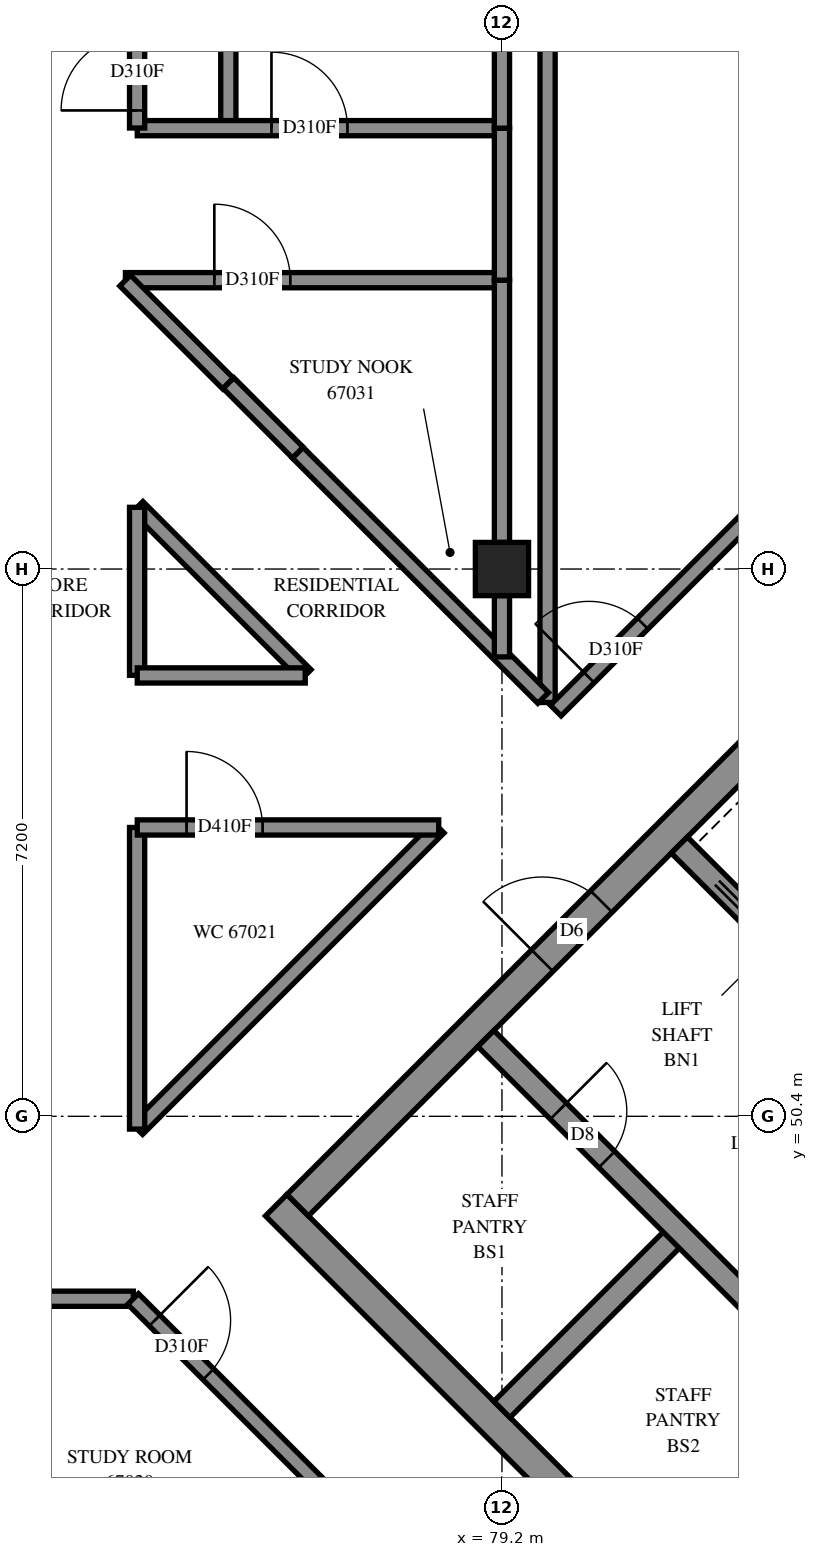
"""IFC4 building model, lengths in metres.
Left out: names, types, materials, properties, quantities, classifications, styles, units other than length and angle.
Written with IfcOpenShell. Run it as: python <this file> out.ifc"""

import sys

from ifc_helpers import new_model, si_unit, direction, frame, frame_2d, origin, origin_2d, place, context, subcontext, project, spatial, rectangle, extrude, element, fill, save


model = new_model("IFC4")
c1 = context("Model", 3, precision=1e-05, world=origin(), true_north=direction((0.0, 1.0)))
c2 = subcontext(c1, "Body", "Model", "MODEL_VIEW")
j1 = project(units=[si_unit("LENGTHUNIT", "METRE"), si_unit("PLANEANGLEUNIT", "RADIAN")], contexts=[c1])
p1 = place(None, origin())
s1 = spatial("IfcSite", under=j1, at=p1, CompositionType="ELEMENT")
p2 = place(p1, origin())
s2 = spatial("IfcBuilding", under=s1, at=p2, CompositionType="ELEMENT")
p3 = place(p2, frame((0.0, 0.0, 247.2)))
s3 = spatial("IfcBuildingStorey", under=s2, at=p3, CompositionType="ELEMENT", Elevation=247.2)
p4 = place(p3, frame((79.2, 57.6, 0.0), z_axis=(0.0, 0.0, 1.0), x_axis=(1.0, 0.0, 0.0)))
e1 = element("IfcColumn", 1, at=p4, inside=s3, PredefinedType="COLUMN", context=c2, shape_type="SweptSolid", body=[
    extrude(rectangle(XDim=0.7, YDim=0.7, at=origin_2d()), origin(), (0.0, 0.0, 1.0), 3.1),
])
p5 = place(p3, frame((76.23, 49.231, -0.3), z_axis=(0.0, 0.0, 1.0), x_axis=(0.7071034917, -0.7071100706, 0.0)))
e2 = element("IfcWall", 2, at=p5, inside=s3, PredefinedType="SHEAR", context=c2, shape_type="SweptSolid", body=[
    extrude(rectangle(XDim=15.2, YDim=0.4, at=frame_2d((7.6, 0.0))), origin(), (0.0, 0.0, 1.0), 2.7),
])
p6 = place(p3, frame((76.513, 49.231, -0.3), z_axis=(0.0, 0.0, 1.0), x_axis=(0.7071067812, 0.7071067812, 0.0)))
e3 = element("IfcWall", 3, at=p6, inside=s3, PredefinedType="SHEAR", context=c2, shape_type="SweptSolid", body=[
    extrude(rectangle(XDim=14.4, YDim=0.4, at=frame_2d((7.2, 0.0))), origin(), (0.0, 0.0, 1.0), 2.7),
])
p7 = place(p6, frame((4.55, 0.0, 0.3)))
e4 = element("IfcOpeningElement", 4, at=p7, cuts=e3, PredefinedType="OPENING", context=c2, shape_type="SweptSolid", body=[
    extrude(rectangle(XDim=1.1, YDim=2.1, at=frame_2d((0.55, 1.05))), frame((0.0, 0.21, 0.0), z_axis=(0.0, -1.0, 0.0), x_axis=(1.0, 0.0, 0.0)), (0.0, 0.0, 1.0), 0.42),
])
p8 = place(p6, frame((11.35, 0.0, 0.3)))
e5 = element("IfcOpeningElement", 5, at=p8, cuts=e3, PredefinedType="OPENING", context=c2, shape_type="SweptSolid", body=[
    extrude(rectangle(XDim=1.1, YDim=2.1, at=frame_2d((0.55, 1.05))), frame((0.0, 0.21, 0.0), z_axis=(0.0, -1.0, 0.0), x_axis=(1.0, 0.0, 0.0)), (0.0, 0.0, 1.0), 0.42),
])
p9 = place(p3, frame((79.2, 46.544, 0.0), z_axis=(0.0, 0.0, 1.0), x_axis=(0.7071219326, 0.7070916295, 0.0)))
e6 = element("IfcWall", 6, at=p9, inside=s3, PredefinedType="SOLIDWALL", context=c2, shape_type="SweptSolid", body=[
    extrude(rectangle(XDim=3.3, YDim=0.3, at=frame_2d((1.65, 0.0))), origin(), (0.0, 0.0, 1.0), 3.1),
])
p10 = place(p3, frame((81.746, 43.999, 0.0), z_axis=(0.0, 0.0, 1.0), x_axis=(0.7071067812, 0.7071067812, 0.0)))
e7 = element("IfcWall", 7, at=p10, inside=s3, PredefinedType="SOLIDWALL", context=c2, shape_type="SweptSolid", body=[
    extrude(rectangle(XDim=3.3, YDim=0.3, at=frame_2d((1.65, 0.0))), origin(), (0.0, 0.0, 1.0), 3.1),
])
p11 = place(p3, frame((78.988, 51.423, 0.0), z_axis=(0.0, 0.0, 1.0), x_axis=(0.7071067812, -0.7071067812, 0.0)))
e8 = element("IfcWall", 8, at=p11, inside=s3, PredefinedType="SOLIDWALL", context=c2, shape_type="SweptSolid", body=[
    extrude(rectangle(XDim=14.4, YDim=0.3, at=frame_2d((7.2, 0.0))), origin(), (0.0, 0.0, 1.0), 3.1),
])
p12 = place(p11, frame((1.35, 0.0, 0.0)))
e9 = element("IfcOpeningElement", 9, at=p12, cuts=e8, PredefinedType="OPENING", context=c2, shape_type="SweptSolid", body=[
    extrude(rectangle(XDim=0.9, YDim=2.1, at=frame_2d((0.45, 1.05))), frame((0.0, 0.16, 0.0), z_axis=(0.0, -1.0, 0.0), x_axis=(1.0, 0.0, 0.0)), (0.0, 0.0, 1.0), 0.32),
])
p13 = place(p11, frame((4.95, 0.0, 0.0)))
e10 = element("IfcOpeningElement", 10, at=p13, cuts=e8, PredefinedType="OPENING", context=c2, shape_type="SweptSolid", body=[
    extrude(rectangle(XDim=0.9, YDim=2.1, at=frame_2d((0.45, 1.05))), frame((0.0, 0.16, 0.0), z_axis=(0.0, -1.0, 0.0), x_axis=(1.0, 0.0, 0.0)), (0.0, 0.0, 1.0), 0.32),
])
p14 = place(p11, frame((8.55, 0.0, 0.0)))
e11 = element("IfcOpeningElement", 11, at=p14, cuts=e8, PredefinedType="OPENING", context=c2, shape_type="SweptSolid", body=[
    extrude(rectangle(XDim=0.9, YDim=2.1, at=frame_2d((0.45, 1.05))), frame((0.0, 0.16, 0.0), z_axis=(0.0, -1.0, 0.0), x_axis=(1.0, 0.0, 0.0)), (0.0, 0.0, 1.0), 0.32),
])
p15 = place(p11, frame((12.05, 0.0, 0.0)))
e12 = element("IfcOpeningElement", 12, at=p15, cuts=e8, PredefinedType="OPENING", context=c2, shape_type="SweptSolid", body=[
    extrude(rectangle(XDim=1.1, YDim=2.1, at=frame_2d((0.55, 1.05))), frame((0.0, 0.16, 0.0), z_axis=(0.0, -1.0, 0.0), x_axis=(1.0, 0.0, 0.0)), (0.0, 0.0, 1.0), 0.32),
])
p16 = place(p3, frame((81.534, 53.969, 0.0), z_axis=(0.0, 0.0, 1.0), x_axis=(0.707103309, -0.7071102534, 0.0)))
e13 = element("IfcWall", 13, at=p16, inside=s3, PredefinedType="SOLIDWALL", context=c2, shape_type="SweptSolid", body=[
    extrude(rectangle(XDim=14.4, YDim=0.3, at=frame_2d((7.2, 0.0))), origin(), (0.0, 0.0, 1.0), 3.1),
])
p17 = place(p16, frame((8.55, 0.0, 0.0)))
e14 = element("IfcOpeningElement", 14, at=p17, cuts=e13, PredefinedType="OPENING", context=c2, shape_type="SweptSolid", body=[
    extrude(rectangle(XDim=0.9, YDim=2.1, at=frame_2d((0.45, 1.05))), frame((0.0, 0.16, 0.0), z_axis=(0.0, -1.0, 0.0), x_axis=(1.0, 0.0, 0.0)), (0.0, 0.0, 1.0), 0.32),
])
p18 = place(p16, frame((1.25, 0.0, 0.0)))
e15 = element("IfcOpeningElement", 15, at=p18, cuts=e13, PredefinedType="OPENING", context=c2, shape_type="SweptSolid", body=[
    extrude(rectangle(XDim=1.1, YDim=2.1, at=frame_2d((0.55, 1.05))), frame((0.0, 0.16, 0.0), z_axis=(0.0, -1.0, 0.0), x_axis=(1.0, 0.0, 0.0)), (0.0, 0.0, 1.0), 0.32),
])
p19 = place(p16, frame((4.85, 0.0, 0.0)))
e16 = element("IfcOpeningElement", 16, at=p19, cuts=e13, PredefinedType="OPENING", context=c2, shape_type="SweptSolid", body=[
    extrude(rectangle(XDim=1.1, YDim=2.1, at=frame_2d((0.55, 1.05))), frame((0.0, 0.16, 0.0), z_axis=(0.0, -1.0, 0.0), x_axis=(1.0, 0.0, 0.0)), (0.0, 0.0, 1.0), 0.32),
])
p20 = place(p16, frame((12.05, 0.0, 0.0)))
e17 = element("IfcOpeningElement", 17, at=p20, cuts=e13, PredefinedType="OPENING", context=c2, shape_type="SweptSolid", body=[
    extrude(rectangle(XDim=1.1, YDim=2.1, at=frame_2d((0.55, 1.05))), frame((0.0, 0.16, 0.0), z_axis=(0.0, -1.0, 0.0), x_axis=(1.0, 0.0, 0.0)), (0.0, 0.0, 1.0), 0.32),
])
p21 = place(p3, frame((55.2, 48.0, 0.0), z_axis=(0.0, 0.0, 1.0), x_axis=(1.0, 0.0, 0.0)))
e18 = element("IfcWall", 18, at=p21, inside=s3, PredefinedType="PARTITIONING", context=c2, shape_type="SweptSolid", body=[
    extrude(rectangle(XDim=19.15, YDim=0.2, at=frame_2d((9.575, 0.0))), origin(), (0.0, 0.0, 1.0), 3.1),
])
p22 = place(p21, frame((6.299, 0.0, 0.0)))
e19 = element("IfcOpeningElement", 19, at=p22, cuts=e18, PredefinedType="OPENING", context=c2, shape_type="SweptSolid", body=[
    extrude(rectangle(XDim=0.9, YDim=2.1, at=frame_2d((0.45, 1.05))), frame((0.0, 0.11, 0.0), z_axis=(0.0, -1.0, 0.0), x_axis=(1.0, 0.0, 0.0)), (0.0, 0.0, 1.0), 0.22),
])
p23 = place(p21, frame((13.499, 0.0, 0.0)))
e20 = element("IfcOpeningElement", 20, at=p23, cuts=e18, PredefinedType="OPENING", context=c2, shape_type="SweptSolid", body=[
    extrude(rectangle(XDim=0.9, YDim=2.1, at=frame_2d((0.45, 1.05))), frame((0.0, 0.11, 0.0), z_axis=(0.0, -1.0, 0.0), x_axis=(1.0, 0.0, 0.0)), (0.0, 0.0, 1.0), 0.22),
])
p24 = place(p3, frame((79.8, 55.844, 0.0), z_axis=(0.0, 0.0, 1.0), x_axis=(0.0, 1.0, 0.0)))
e21 = element("IfcWall", 21, at=p24, inside=s3, PredefinedType="PARTITIONING", context=c2, shape_type="SweptSolid", body=[
    extrude(rectangle(XDim=11.664, YDim=0.2, at=frame_2d((5.832, 0.0))), origin(), (0.0, 0.0, 1.0), 3.1),
])
p25 = place(p3, frame((79.907, 55.739, 0.0), z_axis=(0.0, 0.0, 1.0), x_axis=(0.7071067812, 0.7071067812, 0.0)))
e22 = element("IfcWall", 22, at=p25, inside=s3, PredefinedType="PARTITIONING", context=c2, shape_type="SweptSolid", body=[
    extrude(rectangle(XDim=9.798, YDim=0.2, at=frame_2d((4.899, 0.0))), origin(), (0.0, 0.0, 1.0), 3.1),
])
p26 = place(p25, frame((0.617, 0.0, 0.0)))
e23 = element("IfcOpeningElement", 23, at=p26, cuts=e22, PredefinedType="OPENING", context=c2, shape_type="SweptSolid", body=[
    extrude(rectangle(XDim=1.0, YDim=2.1, at=frame_2d((0.5, 1.05))), frame((0.0, 0.11, 0.0), z_axis=(0.0, -1.0, 0.0), x_axis=(1.0, 0.0, 0.0)), (0.0, 0.0, 1.0), 0.22),
])
p27 = place(p3, frame((75.6, 63.4, 0.0), z_axis=(0.0, 0.0, 1.0), x_axis=(0.0, 1.0, 0.0)))
e24 = element("IfcWall", 24, at=p27, inside=s3, PredefinedType="PARTITIONING", context=c2, shape_type="SweptSolid", body=[
    extrude(rectangle(XDim=9.406, YDim=0.2, at=frame_2d((4.703, 0.0))), origin(), (0.0, 0.0, 1.0), 3.1),
])
p28 = place(p3, frame((74.401, 50.233, 0.0), z_axis=(0.0, 0.0, 1.0), x_axis=(0.7071067812, 0.7071067812, 0.0)))
e25 = element("IfcWall", 25, at=p28, inside=s3, PredefinedType="PARTITIONING", context=c2, shape_type="SweptSolid", body=[
    extrude(rectangle(XDim=5.609, YDim=0.2, at=frame_2d((2.804, 0.0))), origin(), (0.0, 0.0, 1.0), 3.1),
])
p29 = place(p3, frame((74.246, 61.4, 0.0), z_axis=(0.0, 0.0, 1.0), x_axis=(1.0, 0.0, 0.0)))
e26 = element("IfcWall", 26, at=p29, inside=s3, PredefinedType="PARTITIONING", context=c2, shape_type="SweptSolid", body=[
    extrude(rectangle(XDim=4.954, YDim=0.2, at=frame_2d((2.477, 0.0))), origin(), (0.0, 0.0, 1.0), 3.1),
])
p30 = place(p29, frame((1.17, 0.0, 0.0)))
e27 = element("IfcOpeningElement", 27, at=p30, cuts=e26, PredefinedType="OPENING", context=c2, shape_type="SweptSolid", body=[
    extrude(rectangle(XDim=1.0, YDim=2.1, at=frame_2d((0.5, 1.05))), frame((0.0, 0.11, 0.0), z_axis=(0.0, -1.0, 0.0), x_axis=(1.0, 0.0, 0.0)), (0.0, 0.0, 1.0), 0.22),
])
p31 = place(p3, frame((74.402, 63.4, 0.0), z_axis=(0.0, 0.0, 1.0), x_axis=(1.0, 0.0, 0.0)))
e28 = element("IfcWall", 28, at=p31, inside=s3, PredefinedType="PARTITIONING", context=c2, shape_type="SweptSolid", body=[
    extrude(rectangle(XDim=4.798, YDim=0.2, at=frame_2d((2.399, 0.0))), origin(), (0.0, 0.0, 1.0), 3.1),
])
p32 = place(p31, frame((1.766, 0.0, 0.0)))
e29 = element("IfcOpeningElement", 29, at=p32, cuts=e28, PredefinedType="OPENING", context=c2, shape_type="SweptSolid", body=[
    extrude(rectangle(XDim=1.0, YDim=2.1, at=frame_2d((0.5, 1.05))), frame((0.0, 0.11, 0.0), z_axis=(0.0, -1.0, 0.0), x_axis=(1.0, 0.0, 0.0)), (0.0, 0.0, 1.0), 0.22),
])
p33 = place(p3, frame((74.347, 47.997, 0.0), z_axis=(0.0, 0.0, 1.0), x_axis=(0.7071067812, -0.7071067812, 0.0)))
e30 = element("IfcWall", 30, at=p33, inside=s3, PredefinedType="PARTITIONING", context=c2, shape_type="SweptSolid", body=[
    extrude(rectangle(XDim=4.596, YDim=0.2, at=frame_2d((2.298, 0.0))), origin(), (0.0, 0.0, 1.0), 3.1),
])
p34 = place(p33, frame((0.401, 0.0, 0.0)))
e31 = element("IfcOpeningElement", 31, at=p34, cuts=e30, PredefinedType="OPENING", context=c2, shape_type="SweptSolid", body=[
    extrude(rectangle(XDim=1.0, YDim=2.1, at=frame_2d((0.5, 1.05))), frame((0.0, 0.11, 0.0), z_axis=(0.0, -1.0, 0.0), x_axis=(1.0, 0.0, 0.0)), (0.0, 0.0, 1.0), 0.22),
])
p35 = place(p3, frame((76.513, 59.131, 0.0), z_axis=(0.0, 0.0, 1.0), x_axis=(0.7073586681, -0.7068548045, 0.0)))
e32 = element("IfcWall", 32, at=p35, inside=s3, PredefinedType="PARTITIONING", context=c2, shape_type="SweptSolid", body=[
    extrude(rectangle(XDim=4.565, YDim=0.2, at=frame_2d((2.282, 0.0))), origin(), (0.0, 0.0, 1.0), 3.1),
])
p36 = place(p3, frame((74.4, 50.232, 0.0), z_axis=(0.0, 0.0, 1.0), x_axis=(0.0, 1.0, 0.0)))
e33 = element("IfcWall", 33, at=p36, inside=s3, PredefinedType="PARTITIONING", context=c2, shape_type="SweptSolid", body=[
    extrude(rectangle(XDim=3.968, YDim=0.2, at=frame_2d((1.984, 0.0))), origin(), (0.0, 0.0, 1.0), 3.1),
])
p37 = place(p3, frame((74.402, 54.2, 0.0), z_axis=(0.0, 0.0, 1.0), x_axis=(1.0, 0.0, 0.0)))
e34 = element("IfcWall", 34, at=p37, inside=s3, PredefinedType="PARTITIONING", context=c2, shape_type="SweptSolid", body=[
    extrude(rectangle(XDim=3.966, YDim=0.2, at=frame_2d((1.983, 0.0))), origin(), (0.0, 0.0, 1.0), 3.1),
])
p38 = place(p37, frame((0.649, 0.0, 0.0)))
e35 = element("IfcOpeningElement", 35, at=p38, cuts=e34, PredefinedType="OPENING", context=c2, shape_type="SweptSolid", body=[
    extrude(rectangle(XDim=1.0, YDim=2.1, at=frame_2d((0.5, 1.05))), frame((0.0, 0.11, 0.0), z_axis=(0.0, -1.0, 0.0), x_axis=(1.0, 0.0, 0.0)), (0.0, 0.0, 1.0), 0.22),
])
p39 = place(p3, frame((74.4, 63.402, 0.0), z_axis=(0.0, 0.0, 1.0), x_axis=(0.0, 1.0, 0.0)))
e36 = element("IfcWall", 36, at=p39, inside=s3, PredefinedType="PARTITIONING", context=c2, shape_type="SweptSolid", body=[
    extrude(rectangle(XDim=3.798, YDim=0.2, at=frame_2d((1.899, 0.0))), origin(), (0.0, 0.0, 1.0), 3.1),
])
p40 = place(p39, frame((0.231, 0.0, 0.0)))
e37 = element("IfcOpeningElement", 37, at=p40, cuts=e36, PredefinedType="OPENING", context=c2, shape_type="SweptSolid", body=[
    extrude(rectangle(XDim=1.0, YDim=2.1, at=frame_2d((0.5, 1.05))), frame((0.0, 0.11, 0.0), z_axis=(0.0, -1.0, 0.0), x_axis=(1.0, 0.0, 0.0)), (0.0, 0.0, 1.0), 0.22),
])
p41 = place(p3, frame((79.2, 57.95, 0.0), z_axis=(0.0, 0.0, 1.0), x_axis=(0.0, 1.0, 0.0)))
e38 = element("IfcWall", 38, at=p41, inside=s3, PredefinedType="PARTITIONING", context=c2, shape_type="SweptSolid", body=[
    extrude(rectangle(XDim=3.45, YDim=0.2, at=frame_2d((1.725, 0.0))), origin(), (0.0, 0.0, 1.0), 3.1),
])
p42 = place(p3, frame((74.406, 58.417, 0.0), z_axis=(0.0, 0.0, 1.0), x_axis=(0.7071067812, -0.7071067812, 0.0)))
e39 = element("IfcWall", 39, at=p42, inside=s3, PredefinedType="PARTITIONING", context=c2, shape_type="SweptSolid", body=[
    extrude(rectangle(XDim=3.128, YDim=0.2, at=frame_2d((1.564, 0.0))), origin(), (0.0, 0.0, 1.0), 3.1),
])
for number, where, z_axis, x_axis in (
    (40, (74.4, 56.202, 0.0), (0.0, 0.0, 1.0), (0.0, 1.0, 0.0)),
    (41, (74.402, 56.2, 0.0), (0.0, 0.0, 1.0), (1.0, 0.0, 0.0)),
):
    element("IfcWall", number, at=place(p3, frame(where, z_axis=z_axis, x_axis=x_axis)), inside=s3, PredefinedType="PARTITIONING", context=c2, shape_type="SweptSolid", body=[
        extrude(rectangle(XDim=2.21, YDim=0.2, at=frame_2d((1.105, 0.0))), origin(), (0.0, 0.0, 1.0), 3.1),
    ])
p43 = place(p3, frame((79.2, 61.4, 0.0), z_axis=(0.0, 0.0, 1.0), x_axis=(0.0, 1.0, 0.0)))
e42 = element("IfcWall", 42, at=p43, inside=s3, PredefinedType="PARTITIONING", context=c2, shape_type="SweptSolid", body=[
    extrude(rectangle(XDim=2.0, YDim=0.2, at=frame_2d((1.0, 0.0))), origin(), (0.0, 0.0, 1.0), 3.1),
])
p44 = place(p3, frame((74.243, 61.395, 0.0), z_axis=(0.0, 0.0, 1.0), x_axis=(0.7071067812, -0.7071067812, 0.0)))
e43 = element("IfcWall", 43, at=p44, inside=s3, PredefinedType="PARTITIONING", context=c2, shape_type="SweptSolid", body=[
    extrude(rectangle(XDim=1.915, YDim=0.2, at=frame_2d((0.957, 0.0))), origin(), (0.0, 0.0, 1.0), 3.1),
])
p45 = place(p3, frame((75.602, 60.046, 0.0), z_axis=(0.0, 0.0, 1.0), x_axis=(0.7063318703, -0.7078808437, 0.0)))
e44 = element("IfcWall", 44, at=p45, inside=s3, PredefinedType="PARTITIONING", context=c2, shape_type="SweptSolid", body=[
    extrude(rectangle(XDim=1.291, YDim=0.2, at=frame_2d((0.646, 0.0))), origin(), (0.0, 0.0, 1.0), 3.1),
])
p46 = place(p3, frame((79.2, 63.4, 0.0), z_axis=(0.0, 0.0, 1.0), x_axis=(0.0, 1.0, 0.0)))
e45 = element("IfcWall", 45, at=p46, inside=s3, PredefinedType="PARTITIONING", context=c2, shape_type="SweptSolid", body=[
    extrude(rectangle(XDim=1.05, YDim=0.2, at=frame_2d((0.525, 0.0))), origin(), (0.0, 0.0, 1.0), 3.1),
])
p47 = place(p3, frame((79.2, 56.444, 0.0), z_axis=(0.0, 0.0, 1.0), x_axis=(0.0, 1.0, 0.0)))
e46 = element("IfcWall", 46, at=p47, inside=s3, PredefinedType="PARTITIONING", context=c2, shape_type="SweptSolid", body=[
    extrude(rectangle(XDim=0.806, YDim=0.2, at=frame_2d((0.403, 0.0))), origin(), (0.0, 0.0, 1.0), 3.1),
])
p48 = place(p7, origin())
e47 = element("IfcDoor", 47, at=p48, inside=s3, OperationType="DOUBLE_DOOR_SINGLE_SWING", PredefinedType="DOOR", context=c2, shape_type="SweptSolid", body=[
    extrude(rectangle(XDim=1.1, YDim=2.1, at=frame_2d((0.55, 1.05))), frame((0.0, 0.025, 0.0), z_axis=(0.0, -1.0, 0.0), x_axis=(1.0, 0.0, 0.0)), (0.0, 0.0, 1.0), 0.05),
])
fill(e4, e47)
p49 = place(p12, origin())
e48 = element("IfcDoor", 48, at=p49, inside=s3, OperationType="SINGLE_SWING_LEFT", PredefinedType="DOOR", context=c2, shape_type="SweptSolid", body=[
    extrude(rectangle(XDim=0.9, YDim=2.1, at=frame_2d((0.45, 1.05))), frame((0.0, 0.025, 0.0), z_axis=(0.0, -1.0, 0.0), x_axis=(1.0, 0.0, 0.0)), (0.0, 0.0, 1.0), 0.05),
])
fill(e9, e48)
p50 = place(p34, origin())
e49 = element("IfcDoor", 49, at=p50, inside=s3, OperationType="SINGLE_SWING_LEFT", PredefinedType="DOOR", context=c2, shape_type="SweptSolid", body=[
    extrude(rectangle(XDim=1.0, YDim=2.1, at=frame_2d((0.5, 1.05))), frame((0.0, 0.025, 0.0), z_axis=(0.0, -1.0, 0.0), x_axis=(1.0, 0.0, 0.0)), (0.0, 0.0, 1.0), 0.05),
])
fill(e31, e49)
p51 = place(p38, origin())
e50 = element("IfcDoor", 50, at=p51, inside=s3, OperationType="SINGLE_SWING_RIGHT", PredefinedType="DOOR", context=c2, shape_type="SweptSolid", body=[
    extrude(rectangle(XDim=1.0, YDim=2.1, at=frame_2d((0.5, 1.05))), frame((0.0, 0.025, 0.0), z_axis=(0.0, -1.0, 0.0), x_axis=(1.0, 0.0, 0.0)), (0.0, 0.0, 1.0), 0.05),
])
fill(e35, e50)
p52 = place(p40, origin())
e51 = element("IfcDoor", 51, at=p52, inside=s3, OperationType="SINGLE_SWING_RIGHT", PredefinedType="DOOR", context=c2, shape_type="SweptSolid", body=[
    extrude(rectangle(XDim=1.0, YDim=2.1, at=frame_2d((0.5, 1.05))), frame((0.0, 0.025, 0.0), z_axis=(0.0, -1.0, 0.0), x_axis=(1.0, 0.0, 0.0)), (0.0, 0.0, 1.0), 0.05),
])
fill(e37, e51)
p53 = place(p32, origin())
e52 = element("IfcDoor", 52, at=p53, inside=s3, OperationType="SINGLE_SWING_LEFT", PredefinedType="DOOR", context=c2, shape_type="SweptSolid", body=[
    extrude(rectangle(XDim=1.0, YDim=2.1, at=frame_2d((0.5, 1.05))), frame((0.0, 0.025, 0.0), z_axis=(0.0, -1.0, 0.0), x_axis=(1.0, 0.0, 0.0)), (0.0, 0.0, 1.0), 0.05),
])
fill(e29, e52)
p54 = place(p30, origin())
e53 = element("IfcDoor", 53, at=p54, inside=s3, OperationType="SINGLE_SWING_RIGHT", PredefinedType="DOOR", context=c2, shape_type="SweptSolid", body=[
    extrude(rectangle(XDim=1.0, YDim=2.1, at=frame_2d((0.5, 1.05))), frame((0.0, 0.025, 0.0), z_axis=(0.0, -1.0, 0.0), x_axis=(1.0, 0.0, 0.0)), (0.0, 0.0, 1.0), 0.05),
])
fill(e27, e53)
p55 = place(p26, origin())
e54 = element("IfcDoor", 54, at=p55, inside=s3, OperationType="SINGLE_SWING_RIGHT", PredefinedType="DOOR", context=c2, shape_type="SweptSolid", body=[
    extrude(rectangle(XDim=1.0, YDim=2.1, at=frame_2d((0.5, 1.05))), frame((0.0, 0.025, 0.0), z_axis=(0.0, -1.0, 0.0), x_axis=(1.0, 0.0, 0.0)), (0.0, 0.0, 1.0), 0.05),
])
fill(e23, e54)
save(model, sys.argv[1])
